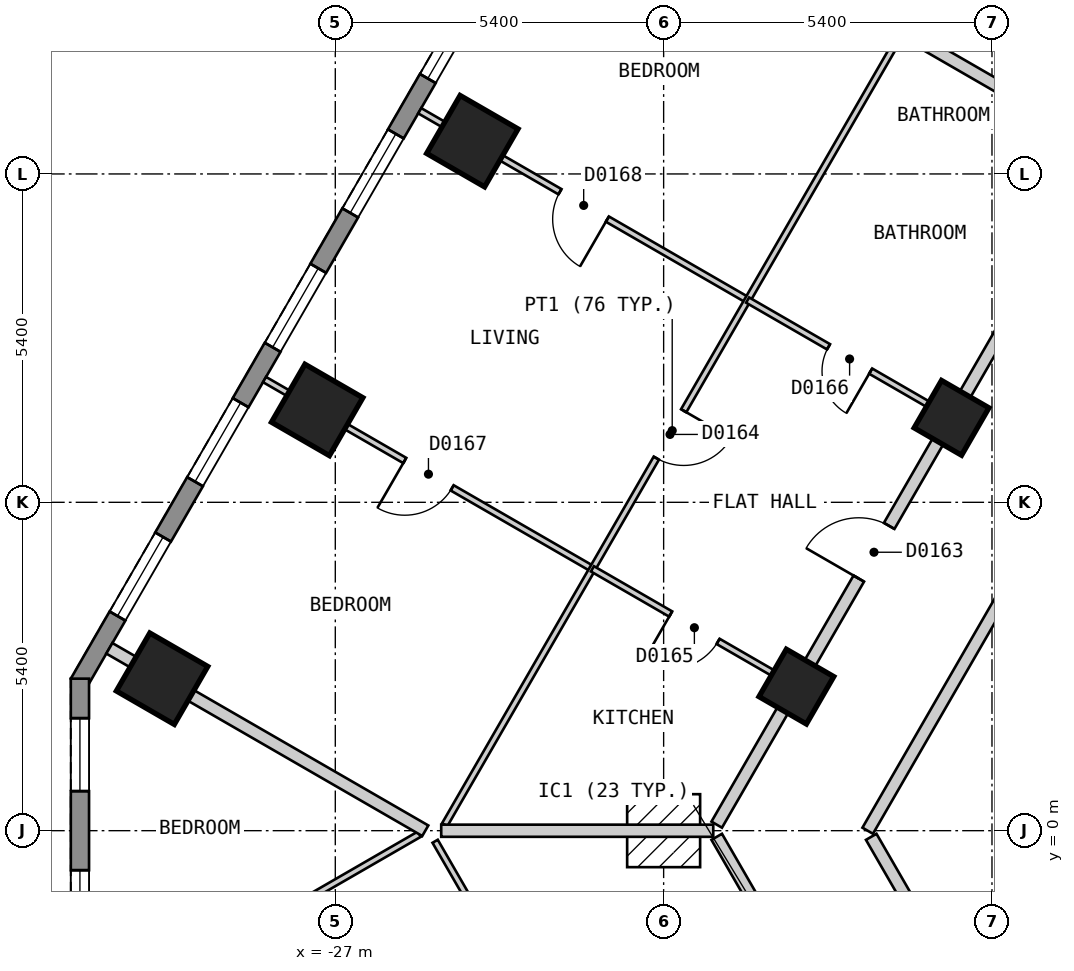
"""IFC4 building model, lengths in metres.
Left out: names, types, materials, properties, quantities, classifications, styles, units other than length and angle.
Written with IfcOpenShell. Run it as: python <this file> out.ifc"""

import sys

from ifc_helpers import new_model, si_unit, direction, frame, frame_2d, origin, origin_2d, place, context, subcontext, project, spatial, polyline, rectangle, outline, extrude, element, fill, save


model = new_model("IFC4")
c1 = context("Model", 3, precision=1e-05, world=origin(), true_north=direction((0.0, 1.0)))
c2 = subcontext(c1, "Body", "Model", "MODEL_VIEW")
j1 = project(units=[si_unit("LENGTHUNIT", "METRE"), si_unit("PLANEANGLEUNIT", "RADIAN")], contexts=[c1])
p1 = place(None, origin())
s1 = spatial("IfcSite", under=j1, at=p1, CompositionType="ELEMENT")
p2 = place(p1, origin())
s2 = spatial("IfcBuilding", under=s1, at=p2, CompositionType="ELEMENT")
p3 = place(p2, frame((0.0, 0.0, 23.4)))
s3 = spatial("IfcBuildingStorey", under=s2, at=p3, CompositionType="ELEMENT", Elevation=23.4)
for number, where, z_axis, x_axis in (
    (1, (-24.746, 11.339, 0.0), (0.0, 0.0, 1.0), (-0.5, -0.866, 0.0)),
    (2, (-27.298, 6.919, 0.0), (0.0, 0.0, 1.0), (-0.5, -0.866, 0.0)),
    (3, (-29.849, 2.499, 0.0), (0.0, 0.0, 1.0), (-0.5, -0.866, 0.0)),
):
    element("IfcColumn", number, at=place(p3, frame(where, z_axis=z_axis, x_axis=x_axis)), inside=s3, PredefinedType="COLUMN", context=c2, shape_type="SweptSolid", body=[
        extrude(rectangle(XDim=1.1, YDim=1.1, at=origin_2d()), origin(), (0.0, 0.0, 1.0), 3.0),
    ])
for number, where, z_axis, x_axis in (
    (4, (-16.865, 6.789, 0.0), (0.0, 0.0, 1.0), (-0.5, -0.866, 0.0)),
    (5, (-19.417, 2.369, 0.0), (0.0, 0.0, 1.0), (-0.5, -0.866, 0.0)),
):
    element("IfcColumn", number, at=place(p3, frame(where, z_axis=z_axis, x_axis=x_axis)), inside=s3, PredefinedType="COLUMN", context=c2, shape_type="SweptSolid", body=[
        extrude(rectangle(XDim=0.9, YDim=0.9, at=origin_2d()), origin(), (0.0, 0.0, 1.0), 3.0),
    ])
p4 = place(p3, frame((-17.71, 25.825, 0.0), z_axis=(0.0, 0.0, 1.0), x_axis=(-0.500001938803, -0.866024284413, 0.0)))
e6 = element("IfcWall", 6, at=p4, inside=s3, PredefinedType="SOLIDWALL", context=c2, shape_type="SweptSolid", body=[
    extrude(outline(polyline([(0.0, -0.15), (27.02, -0.15), (26.94, 0.15), (0.08, 0.15), (0.0, -0.15)])), origin(), (0.0, 0.0, 1.0), 2.7),
])
p5 = place(p4, frame((1.277, 0.0, 0.15)))
e7 = element("IfcOpeningElement", 7, at=p5, cuts=e6, PredefinedType="OPENING", context=c2, shape_type="SweptSolid", body=[
    extrude(rectangle(XDim=1.5, YDim=2.1, at=frame_2d((0.75, 1.05))), frame((0.0, 0.16, 0.0), z_axis=(0.0, -1.0, 0.0), x_axis=(1.0, 0.0, 0.0)), (0.0, 0.0, 1.0), 0.32),
])
p6 = place(p4, frame((3.829, 0.0, 0.15)))
e8 = element("IfcOpeningElement", 8, at=p6, cuts=e6, PredefinedType="OPENING", context=c2, shape_type="SweptSolid", body=[
    extrude(rectangle(XDim=1.5, YDim=2.1, at=frame_2d((0.75, 1.05))), frame((0.0, 0.16, 0.0), z_axis=(0.0, -1.0, 0.0), x_axis=(1.0, 0.0, 0.0)), (0.0, 0.0, 1.0), 0.32),
])
p7 = place(p4, frame((6.382, 0.0, 0.15)))
e9 = element("IfcOpeningElement", 9, at=p7, cuts=e6, PredefinedType="OPENING", context=c2, shape_type="SweptSolid", body=[
    extrude(rectangle(XDim=1.5, YDim=2.1, at=frame_2d((0.75, 1.05))), frame((0.0, 0.16, 0.0), z_axis=(0.0, -1.0, 0.0), x_axis=(1.0, 0.0, 0.0)), (0.0, 0.0, 1.0), 0.32),
])
p8 = place(p4, frame((8.933, 0.0, 0.15)))
e10 = element("IfcOpeningElement", 10, at=p8, cuts=e6, PredefinedType="OPENING", context=c2, shape_type="SweptSolid", body=[
    extrude(rectangle(XDim=1.5, YDim=2.1, at=frame_2d((0.75, 1.05))), frame((0.0, 0.16, 0.0), z_axis=(0.0, -1.0, 0.0), x_axis=(1.0, 0.0, 0.0)), (0.0, 0.0, 1.0), 0.32),
])
p9 = place(p4, frame((11.485, 0.0, 0.15)))
e11 = element("IfcOpeningElement", 11, at=p9, cuts=e6, PredefinedType="OPENING", context=c2, shape_type="SweptSolid", body=[
    extrude(rectangle(XDim=1.5, YDim=2.1, at=frame_2d((0.75, 1.05))), frame((0.0, 0.16, 0.0), z_axis=(0.0, -1.0, 0.0), x_axis=(1.0, 0.0, 0.0)), (0.0, 0.0, 1.0), 0.32),
])
p10 = place(p4, frame((14.037, 0.0, 0.15)))
e12 = element("IfcOpeningElement", 12, at=p10, cuts=e6, PredefinedType="OPENING", context=c2, shape_type="SweptSolid", body=[
    extrude(rectangle(XDim=1.5, YDim=2.1, at=frame_2d((0.75, 1.05))), frame((0.0, 0.16, 0.0), z_axis=(0.0, -1.0, 0.0), x_axis=(1.0, 0.0, 0.0)), (0.0, 0.0, 1.0), 0.32),
])
p11 = place(p4, frame((16.589, 0.0, 0.15)))
e13 = element("IfcOpeningElement", 13, at=p11, cuts=e6, PredefinedType="OPENING", context=c2, shape_type="SweptSolid", body=[
    extrude(rectangle(XDim=1.5, YDim=2.1, at=frame_2d((0.75, 1.05))), frame((0.0, 0.16, 0.0), z_axis=(0.0, -1.0, 0.0), x_axis=(1.0, 0.0, 0.0)), (0.0, 0.0, 1.0), 0.32),
])
p12 = place(p4, frame((19.141, 0.0, 0.15)))
e14 = element("IfcOpeningElement", 14, at=p12, cuts=e6, PredefinedType="OPENING", context=c2, shape_type="SweptSolid", body=[
    extrude(rectangle(XDim=1.5, YDim=2.1, at=frame_2d((0.75, 1.05))), frame((0.0, 0.16, 0.0), z_axis=(0.0, -1.0, 0.0), x_axis=(1.0, 0.0, 0.0)), (0.0, 0.0, 1.0), 0.32),
])
p13 = place(p4, frame((21.693, 0.0, 0.15)))
e15 = element("IfcOpeningElement", 15, at=p13, cuts=e6, PredefinedType="OPENING", context=c2, shape_type="SweptSolid", body=[
    extrude(rectangle(XDim=1.5, YDim=2.1, at=frame_2d((0.75, 1.05))), frame((0.0, 0.16, 0.0), z_axis=(0.0, -1.0, 0.0), x_axis=(1.0, 0.0, 0.0)), (0.0, 0.0, 1.0), 0.32),
])
p14 = place(p4, frame((24.244, 0.0, 0.15)))
e16 = element("IfcOpeningElement", 16, at=p14, cuts=e6, PredefinedType="OPENING", context=c2, shape_type="SweptSolid", body=[
    extrude(rectangle(XDim=1.5, YDim=2.1, at=frame_2d((0.75, 1.05))), frame((0.0, 0.16, 0.0), z_axis=(0.0, -1.0, 0.0), x_axis=(1.0, 0.0, 0.0)), (0.0, 0.0, 1.0), 0.32),
])
p15 = place(p3, frame((-31.2, 2.5, 0.0), z_axis=(0.0, 0.0, 1.0), x_axis=(0.0, -1.0, 0.0)))
e17 = element("IfcWall", 17, at=p15, inside=s3, PredefinedType="SOLIDWALL", context=c2, shape_type="SweptSolid", body=[
    extrude(outline(polyline([(0.0, -0.15), (5.0, -0.15), (4.92, 0.15), (0.08, 0.15), (0.0, -0.15)])), origin(), (0.0, 0.0, 1.0), 2.7),
])
p16 = place(p15, frame((0.65, 0.0, 0.15)))
e18 = element("IfcOpeningElement", 18, at=p16, cuts=e17, PredefinedType="OPENING", context=c2, shape_type="SweptSolid", body=[
    extrude(rectangle(XDim=1.2, YDim=2.1, at=frame_2d((0.6, 1.05))), frame((0.0, 0.16, 0.0), z_axis=(0.0, -1.0, 0.0), x_axis=(1.0, 0.0, 0.0)), (0.0, 0.0, 1.0), 0.32),
])
p17 = place(p15, frame((3.15, 0.0, 0.15)))
e19 = element("IfcOpeningElement", 19, at=p17, cuts=e17, PredefinedType="OPENING", context=c2, shape_type="SweptSolid", body=[
    extrude(rectangle(XDim=1.2, YDim=2.1, at=frame_2d((0.6, 1.05))), frame((0.0, 0.16, 0.0), z_axis=(0.0, -1.0, 0.0), x_axis=(1.0, 0.0, 0.0)), (0.0, 0.0, 1.0), 0.32),
])
p18 = place(p3, frame((-18.186, -0.101, 0.0), z_axis=(0.0, 0.0, 1.0), x_axis=(0.499997591167, -0.86602679452, 0.0)))
e20 = element("IfcWall", 20, at=p18, inside=s3, PredefinedType="PARTITIONING", context=c2, shape_type="SweptSolid", body=[
    extrude(rectangle(XDim=5.172, YDim=0.2, at=frame_2d((2.586, 0.0))), origin(), (0.0, 0.0, 1.0), 2.7),
])
p19 = place(p3, frame((-20.727, -0.101, 0.0), z_axis=(0.0, 0.0, 1.0), x_axis=(0.500065652488, -0.865987495984, 0.0)))
e21 = element("IfcWall", 21, at=p19, inside=s3, PredefinedType="PARTITIONING", context=c2, shape_type="SweptSolid", body=[
    extrude(rectangle(XDim=7.389, YDim=0.2, at=frame_2d((3.695, 0.0))), origin(), (0.0, 0.0, 1.0), 2.7),
])
p20 = place(p19, frame((5.654, 0.0, 0.0)))
e22 = element("IfcOpeningElement", 22, at=p20, cuts=e21, PredefinedType="OPENING", context=c2, shape_type="SweptSolid", body=[
    extrude(rectangle(XDim=1.0, YDim=2.1, at=frame_2d((0.5, 1.05))), frame((0.0, 0.11, 0.0), z_axis=(0.0, -1.0, 0.0), x_axis=(1.0, 0.0, 0.0)), (0.0, 0.0, 1.0), 0.22),
])
p21 = place(p3, frame((-18.244, -0.001, 0.0), z_axis=(0.0, 0.0, 1.0), x_axis=(0.499962999376, 0.866046765051, 0.0)))
e23 = element("IfcWall", 23, at=p21, inside=s3, PredefinedType="PARTITIONING", context=c2, shape_type="SweptSolid", body=[
    extrude(rectangle(XDim=18.245, YDim=0.2, at=frame_2d((9.123, 0.0))), origin(), (0.0, 0.0, 1.0), 2.7),
])
p22 = place(p21, frame((8.672, 0.0, 0.0)))
e24 = element("IfcOpeningElement", 24, at=p22, cuts=e23, PredefinedType="OPENING", context=c2, shape_type="SweptSolid", body=[
    extrude(rectangle(XDim=0.9, YDim=2.1, at=frame_2d((0.45, 1.05))), frame((0.0, 0.11, 0.0), z_axis=(0.0, -1.0, 0.0), x_axis=(1.0, 0.0, 0.0)), (0.0, 0.0, 1.0), 0.22),
])
p23 = place(p3, frame((-20.727, 0.099, 0.0), z_axis=(0.0, 0.0, 1.0), x_axis=(0.499993204491, 0.866029327138, 0.0)))
e25 = element("IfcWall", 25, at=p23, inside=s3, PredefinedType="PARTITIONING", context=c2, shape_type="SweptSolid", body=[
    extrude(rectangle(XDim=20.554, YDim=0.2, at=frame_2d((10.277, 0.0))), origin(), (0.0, 0.0, 1.0), 2.7),
])
p24 = place(p23, frame((14.88, 0.0, 0.0)))
e26 = element("IfcOpeningElement", 26, at=p24, cuts=e25, PredefinedType="OPENING", context=c2, shape_type="SweptSolid", body=[
    extrude(rectangle(XDim=1.0, YDim=2.1, at=frame_2d((0.5, 1.05))), frame((0.0, 0.11, 0.0), z_axis=(0.0, -1.0, 0.0), x_axis=(1.0, 0.0, 0.0)), (0.0, 0.0, 1.0), 0.22),
])
p25 = place(p23, frame((4.673, 0.0, 0.0)))
e27 = element("IfcOpeningElement", 27, at=p25, cuts=e25, PredefinedType="OPENING", context=c2, shape_type="SweptSolid", body=[
    extrude(rectangle(XDim=1.0, YDim=2.1, at=frame_2d((0.5, 1.05))), frame((0.0, 0.11, 0.0), z_axis=(0.0, -1.0, 0.0), x_axis=(1.0, 0.0, 0.0)), (0.0, 0.0, 1.0), 0.22),
])
p26 = place(p3, frame((-25.358, -0.174, 0.0), z_axis=(0.0, 0.0, 1.0), x_axis=(0.500093956194, -0.865971151354, 0.0)))
e28 = element("IfcWall", 28, at=p26, inside=s3, PredefinedType="PARTITIONING", context=c2, shape_type="SweptSolid", body=[
    extrude(rectangle(XDim=4.873, YDim=0.1, at=frame_2d((2.437, 0.0))), origin(), (0.0, 0.0, 1.0), 2.7),
])
p27 = place(p26, frame((1.937, 0.0, 0.0)))
e29 = element("IfcOpeningElement", 29, at=p27, cuts=e28, PredefinedType="OPENING", context=c2, shape_type="SweptSolid", body=[
    extrude(rectangle(XDim=0.8, YDim=2.1, at=frame_2d((0.4, 1.05))), frame((0.0, 0.06, 0.0), z_axis=(0.0, -1.0, 0.0), x_axis=(1.0, 0.0, 0.0)), (0.0, 0.0, 1.0), 0.12),
])
p28 = place(p3, frame((-28.164, 7.419, 0.0), z_axis=(0.0, 0.0, 1.0), x_axis=(0.86607068519, -0.499921562103, 0.0)))
e30 = element("IfcWall", 30, at=p28, inside=s3, PredefinedType="PARTITIONING", context=c2, shape_type="SweptSolid", body=[
    extrude(rectangle(XDim=6.227, YDim=0.1, at=frame_2d((3.114, 0.0))), origin(), (0.0, 0.0, 1.0), 2.7),
])
p29 = place(p28, frame((2.663, 0.0, 0.0)))
e31 = element("IfcOpeningElement", 31, at=p29, cuts=e30, PredefinedType="OPENING", context=c2, shape_type="SweptSolid", body=[
    extrude(rectangle(XDim=0.9, YDim=2.1, at=frame_2d((0.45, 1.05))), frame((0.0, 0.06, 0.0), z_axis=(0.0, -1.0, 0.0), x_axis=(1.0, 0.0, 0.0)), (0.0, 0.0, 1.0), 0.12),
])
p30 = place(p3, frame((-25.611, 11.839, 0.0), z_axis=(0.0, 0.0, 1.0), x_axis=(0.866031483044, -0.499989470266, 0.0)))
e32 = element("IfcWall", 32, at=p30, inside=s3, PredefinedType="PARTITIONING", context=c2, shape_type="SweptSolid", body=[
    extrude(rectangle(XDim=6.226, YDim=0.1, at=frame_2d((3.113, 0.0))), origin(), (0.0, 0.0, 1.0), 2.7),
])
p31 = place(p30, frame((2.663, 0.0, 0.0)))
e33 = element("IfcOpeningElement", 33, at=p31, cuts=e32, PredefinedType="OPENING", context=c2, shape_type="SweptSolid", body=[
    extrude(rectangle(XDim=0.9, YDim=2.1, at=frame_2d((0.45, 1.05))), frame((0.0, 0.06, 0.0), z_axis=(0.0, -1.0, 0.0), x_axis=(1.0, 0.0, 0.0)), (0.0, 0.0, 1.0), 0.12),
])
p32 = place(p3, frame((-17.056, 14.758, 0.0), z_axis=(0.0, 0.0, 1.0), x_axis=(0.866035025835, -0.499983333749, 0.0)))
e34 = element("IfcWall", 34, at=p32, inside=s3, PredefinedType="PARTITIONING", context=c2, shape_type="SweptSolid", body=[
    extrude(rectangle(XDim=4.051, YDim=0.1, at=frame_2d((2.025, 0.0))), origin(), (0.0, 0.0, 1.0), 2.7),
])
p33 = place(p32, frame((1.65, 0.0, 0.0)))
e35 = element("IfcOpeningElement", 35, at=p33, cuts=e34, PredefinedType="OPENING", context=c2, shape_type="SweptSolid", body=[
    extrude(rectangle(XDim=0.8, YDim=2.1, at=frame_2d((0.4, 1.05))), frame((0.0, 0.06, 0.0), z_axis=(0.0, -1.0, 0.0), x_axis=(1.0, 0.0, 0.0)), (0.0, 0.0, 1.0), 0.12),
])
p34 = place(p3, frame((-25.2, 0.099, 0.0), z_axis=(0.0, 0.0, 1.0), x_axis=(0.49997477318, 0.866039968006, 0.0)))
e36 = element("IfcWall", 36, at=p34, inside=s3, PredefinedType="PARTITIONING", context=c2, shape_type="SweptSolid", body=[
    extrude(rectangle(XDim=14.965, YDim=0.1, at=frame_2d((7.482, 0.0))), origin(), (0.0, 0.0, 1.0), 2.7),
])
p35 = place(p34, frame((6.96, 0.0, 0.0)))
e37 = element("IfcOpeningElement", 37, at=p35, cuts=e36, PredefinedType="OPENING", context=c2, shape_type="SweptSolid", body=[
    extrude(rectangle(XDim=0.9, YDim=2.1, at=frame_2d((0.45, 1.05))), frame((0.0, 0.06, 0.0), z_axis=(0.0, -1.0, 0.0), x_axis=(1.0, 0.0, 0.0)), (0.0, 0.0, 1.0), 0.12),
])
p36 = place(p3, frame((-30.715, -3.0, 0.0), z_axis=(0.0, 0.0, 1.0), x_axis=(0.866054318203, 0.499949915414, 0.0)))
e38 = element("IfcWall", 38, at=p36, inside=s3, PredefinedType="PARTITIONING", context=c2, shape_type="SweptSolid", body=[
    extrude(rectangle(XDim=5.884, YDim=0.1, at=frame_2d((2.942, 0.0))), origin(), (0.0, 0.0, 1.0), 2.7),
])
p37 = place(p36, frame((2.55, 0.0, 0.0)))
e39 = element("IfcOpeningElement", 39, at=p37, cuts=e38, PredefinedType="OPENING", context=c2, shape_type="SweptSolid", body=[
    extrude(rectangle(XDim=0.9, YDim=2.1, at=frame_2d((0.45, 1.05))), frame((0.0, 0.06, 0.0), z_axis=(0.0, -1.0, 0.0), x_axis=(1.0, 0.0, 0.0)), (0.0, 0.0, 1.0), 0.12),
])
p38 = place(p3, frame((-30.716, 2.999, 0.0), z_axis=(0.0, 0.0, 1.0), x_axis=(0.866020924479, -0.500007758305, 0.0)))
e40 = element("IfcWall", 40, at=p38, inside=s3, PredefinedType="PARTITIONING", context=c2, shape_type="SweptSolid", body=[
    extrude(rectangle(XDim=6.0, YDim=0.2, at=frame_2d((3.0, 0.0))), origin(), (0.0, 0.0, 1.0), 2.7),
])
p39 = place(p3, frame((-23.06, 16.259, 0.0), z_axis=(0.0, 0.0, 1.0), x_axis=(0.866047370643, -0.499961950354, 0.0)))
e41 = element("IfcWall", 41, at=p39, inside=s3, PredefinedType="PARTITIONING", context=c2, shape_type="SweptSolid", body=[
    extrude(rectangle(XDim=10.001, YDim=0.2, at=frame_2d((5.0, 0.0))), origin(), (0.0, 0.0, 1.0), 2.7),
])
p40 = place(p3, frame((-25.258, -0.001, 0.0), z_axis=(0.0, 0.0, 1.0), x_axis=(1.0, 0.0, 0.0)))
e42 = element("IfcWall", 42, at=p40, inside=s3, PredefinedType="PARTITIONING", context=c2, shape_type="SweptSolid", body=[
    extrude(rectangle(XDim=4.474, YDim=0.2, at=frame_2d((2.237, 0.0))), origin(), (0.0, 0.0, 1.0), 2.7),
])
p41 = place(p3, frame((-22.771, 4.306, 0.0), z_axis=(0.0, 0.0, 1.0), x_axis=(0.866008894869, -0.50002859319, 0.0)))
e43 = element("IfcWall", 43, at=p41, inside=s3, PredefinedType="PARTITIONING", context=c2, shape_type="SweptSolid", body=[
    extrude(rectangle(XDim=3.774, YDim=0.1, at=frame_2d((1.887, 0.0))), origin(), (0.0, 0.0, 1.0), 2.7),
])
p42 = place(p41, frame((1.486, 0.0, 0.0)))
e44 = element("IfcOpeningElement", 44, at=p42, cuts=e43, PredefinedType="OPENING", context=c2, shape_type="SweptSolid", body=[
    extrude(rectangle(XDim=0.9, YDim=2.1, at=frame_2d((0.45, 1.05))), frame((0.0, 0.06, 0.0), z_axis=(0.0, -1.0, 0.0), x_axis=(1.0, 0.0, 0.0)), (0.0, 0.0, 1.0), 0.12),
])
p43 = place(p3, frame((-20.219, 8.726, 0.0), z_axis=(0.0, 0.0, 1.0), x_axis=(0.866008894869, -0.50002859319, 0.0)))
e45 = element("IfcWall", 45, at=p43, inside=s3, PredefinedType="PARTITIONING", context=c2, shape_type="SweptSolid", body=[
    extrude(rectangle(XDim=3.774, YDim=0.1, at=frame_2d((1.887, 0.0))), origin(), (0.0, 0.0, 1.0), 2.7),
])
p44 = place(p43, frame((1.537, 0.0, 0.0)))
e46 = element("IfcOpeningElement", 46, at=p44, cuts=e45, PredefinedType="OPENING", context=c2, shape_type="SweptSolid", body=[
    extrude(rectangle(XDim=0.8, YDim=2.1, at=frame_2d((0.4, 1.05))), frame((0.0, 0.06, 0.0), z_axis=(0.0, -1.0, 0.0), x_axis=(1.0, 0.0, 0.0)), (0.0, 0.0, 1.0), 0.12),
])
p45 = place(p10, origin())
e47 = element("IfcWindow", 47, at=p45, inside=s3, PartitioningType="SINGLE_PANEL", PredefinedType="WINDOW", context=c2, shape_type="SweptSolid", body=[
    extrude(rectangle(XDim=1.5, YDim=2.1, at=frame_2d((0.75, 1.05))), frame((0.0, 0.03, 0.0), z_axis=(0.0, -1.0, 0.0), x_axis=(1.0, 0.0, 0.0)), (0.0, 0.0, 1.0), 0.06),
])
fill(e12, e47)
p46 = place(p11, origin())
e48 = element("IfcWindow", 48, at=p46, inside=s3, PartitioningType="SINGLE_PANEL", PredefinedType="WINDOW", context=c2, shape_type="SweptSolid", body=[
    extrude(rectangle(XDim=1.5, YDim=2.1, at=frame_2d((0.75, 1.05))), frame((0.0, 0.03, 0.0), z_axis=(0.0, -1.0, 0.0), x_axis=(1.0, 0.0, 0.0)), (0.0, 0.0, 1.0), 0.06),
])
fill(e13, e48)
p47 = place(p12, origin())
e49 = element("IfcWindow", 49, at=p47, inside=s3, PartitioningType="SINGLE_PANEL", PredefinedType="WINDOW", context=c2, shape_type="SweptSolid", body=[
    extrude(rectangle(XDim=1.5, YDim=2.1, at=frame_2d((0.75, 1.05))), frame((0.0, 0.03, 0.0), z_axis=(0.0, -1.0, 0.0), x_axis=(1.0, 0.0, 0.0)), (0.0, 0.0, 1.0), 0.06),
])
fill(e14, e49)
p48 = place(p13, origin())
e50 = element("IfcWindow", 50, at=p48, inside=s3, PartitioningType="SINGLE_PANEL", PredefinedType="WINDOW", context=c2, shape_type="SweptSolid", body=[
    extrude(rectangle(XDim=1.5, YDim=2.1, at=frame_2d((0.75, 1.05))), frame((0.0, 0.03, 0.0), z_axis=(0.0, -1.0, 0.0), x_axis=(1.0, 0.0, 0.0)), (0.0, 0.0, 1.0), 0.06),
])
fill(e15, e50)
p49 = place(p14, origin())
e51 = element("IfcWindow", 51, at=p49, inside=s3, PartitioningType="SINGLE_PANEL", PredefinedType="WINDOW", context=c2, shape_type="SweptSolid", body=[
    extrude(rectangle(XDim=1.5, YDim=2.1, at=frame_2d((0.75, 1.05))), frame((0.0, 0.03, 0.0), z_axis=(0.0, -1.0, 0.0), x_axis=(1.0, 0.0, 0.0)), (0.0, 0.0, 1.0), 0.06),
])
fill(e16, e51)
p50 = place(p16, origin())
e52 = element("IfcWindow", 52, at=p50, inside=s3, PartitioningType="SINGLE_PANEL", PredefinedType="WINDOW", context=c2, shape_type="SweptSolid", body=[
    extrude(rectangle(XDim=1.2, YDim=2.1, at=frame_2d((0.6, 1.05))), frame((0.0, 0.03, 0.0), z_axis=(0.0, -1.0, 0.0), x_axis=(1.0, 0.0, 0.0)), (0.0, 0.0, 1.0), 0.06),
])
fill(e18, e52)
p51 = place(p17, origin())
e53 = element("IfcWindow", 53, at=p51, inside=s3, PartitioningType="SINGLE_PANEL", PredefinedType="WINDOW", context=c2, shape_type="SweptSolid", body=[
    extrude(rectangle(XDim=1.2, YDim=2.1, at=frame_2d((0.6, 1.05))), frame((0.0, 0.03, 0.0), z_axis=(0.0, -1.0, 0.0), x_axis=(1.0, 0.0, 0.0)), (0.0, 0.0, 1.0), 0.06),
])
fill(e19, e53)
p52 = place(p25, origin())
e54 = element("IfcDoor", 54, at=p52, inside=s3, OperationType="SINGLE_SWING_LEFT", PredefinedType="DOOR", context=c2, shape_type="SweptSolid", body=[
    extrude(rectangle(XDim=1.0, YDim=2.1, at=frame_2d((0.5, 1.05))), frame((0.0, 0.025, 0.0), z_axis=(0.0, -1.0, 0.0), x_axis=(1.0, 0.0, 0.0)), (0.0, 0.0, 1.0), 0.05),
])
fill(e27, e54)
p53 = place(p35, origin())
e55 = element("IfcDoor", 55, at=p53, inside=s3, OperationType="SINGLE_SWING_RIGHT", PredefinedType="DOOR", context=c2, shape_type="SweptSolid", body=[
    extrude(rectangle(XDim=0.9, YDim=2.1, at=frame_2d((0.45, 1.05))), frame((0.0, 0.025, 0.0), z_axis=(0.0, -1.0, 0.0), x_axis=(1.0, 0.0, 0.0)), (0.0, 0.0, 1.0), 0.05),
])
fill(e37, e55)
p54 = place(p42, origin())
e56 = element("IfcDoor", 56, at=p54, inside=s3, OperationType="SINGLE_SWING_LEFT", PredefinedType="DOOR", context=c2, shape_type="SweptSolid", body=[
    extrude(rectangle(XDim=0.9, YDim=2.1, at=frame_2d((0.45, 1.05))), frame((0.0, 0.025, 0.0), z_axis=(0.0, -1.0, 0.0), x_axis=(1.0, 0.0, 0.0)), (0.0, 0.0, 1.0), 0.05),
])
fill(e44, e56)
p55 = place(p44, origin())
e57 = element("IfcDoor", 57, at=p55, inside=s3, OperationType="SINGLE_SWING_RIGHT", PredefinedType="DOOR", context=c2, shape_type="SweptSolid", body=[
    extrude(rectangle(XDim=0.8, YDim=2.1, at=frame_2d((0.4, 1.05))), frame((0.0, 0.025, 0.0), z_axis=(0.0, -1.0, 0.0), x_axis=(1.0, 0.0, 0.0)), (0.0, 0.0, 1.0), 0.05),
])
fill(e46, e57)
p56 = place(p29, origin())
e58 = element("IfcDoor", 58, at=p56, inside=s3, OperationType="SINGLE_SWING_LEFT", PredefinedType="DOOR", context=c2, shape_type="SweptSolid", body=[
    extrude(rectangle(XDim=0.9, YDim=2.1, at=frame_2d((0.45, 1.05))), frame((0.0, 0.025, 0.0), z_axis=(0.0, -1.0, 0.0), x_axis=(1.0, 0.0, 0.0)), (0.0, 0.0, 1.0), 0.05),
])
fill(e31, e58)
p57 = place(p31, origin())
e59 = element("IfcDoor", 59, at=p57, inside=s3, OperationType="SINGLE_SWING_RIGHT", PredefinedType="DOOR", context=c2, shape_type="SweptSolid", body=[
    extrude(rectangle(XDim=0.9, YDim=2.1, at=frame_2d((0.45, 1.05))), frame((0.0, 0.025, 0.0), z_axis=(0.0, -1.0, 0.0), x_axis=(1.0, 0.0, 0.0)), (0.0, 0.0, 1.0), 0.05),
])
fill(e33, e59)
save(model, sys.argv[1])
